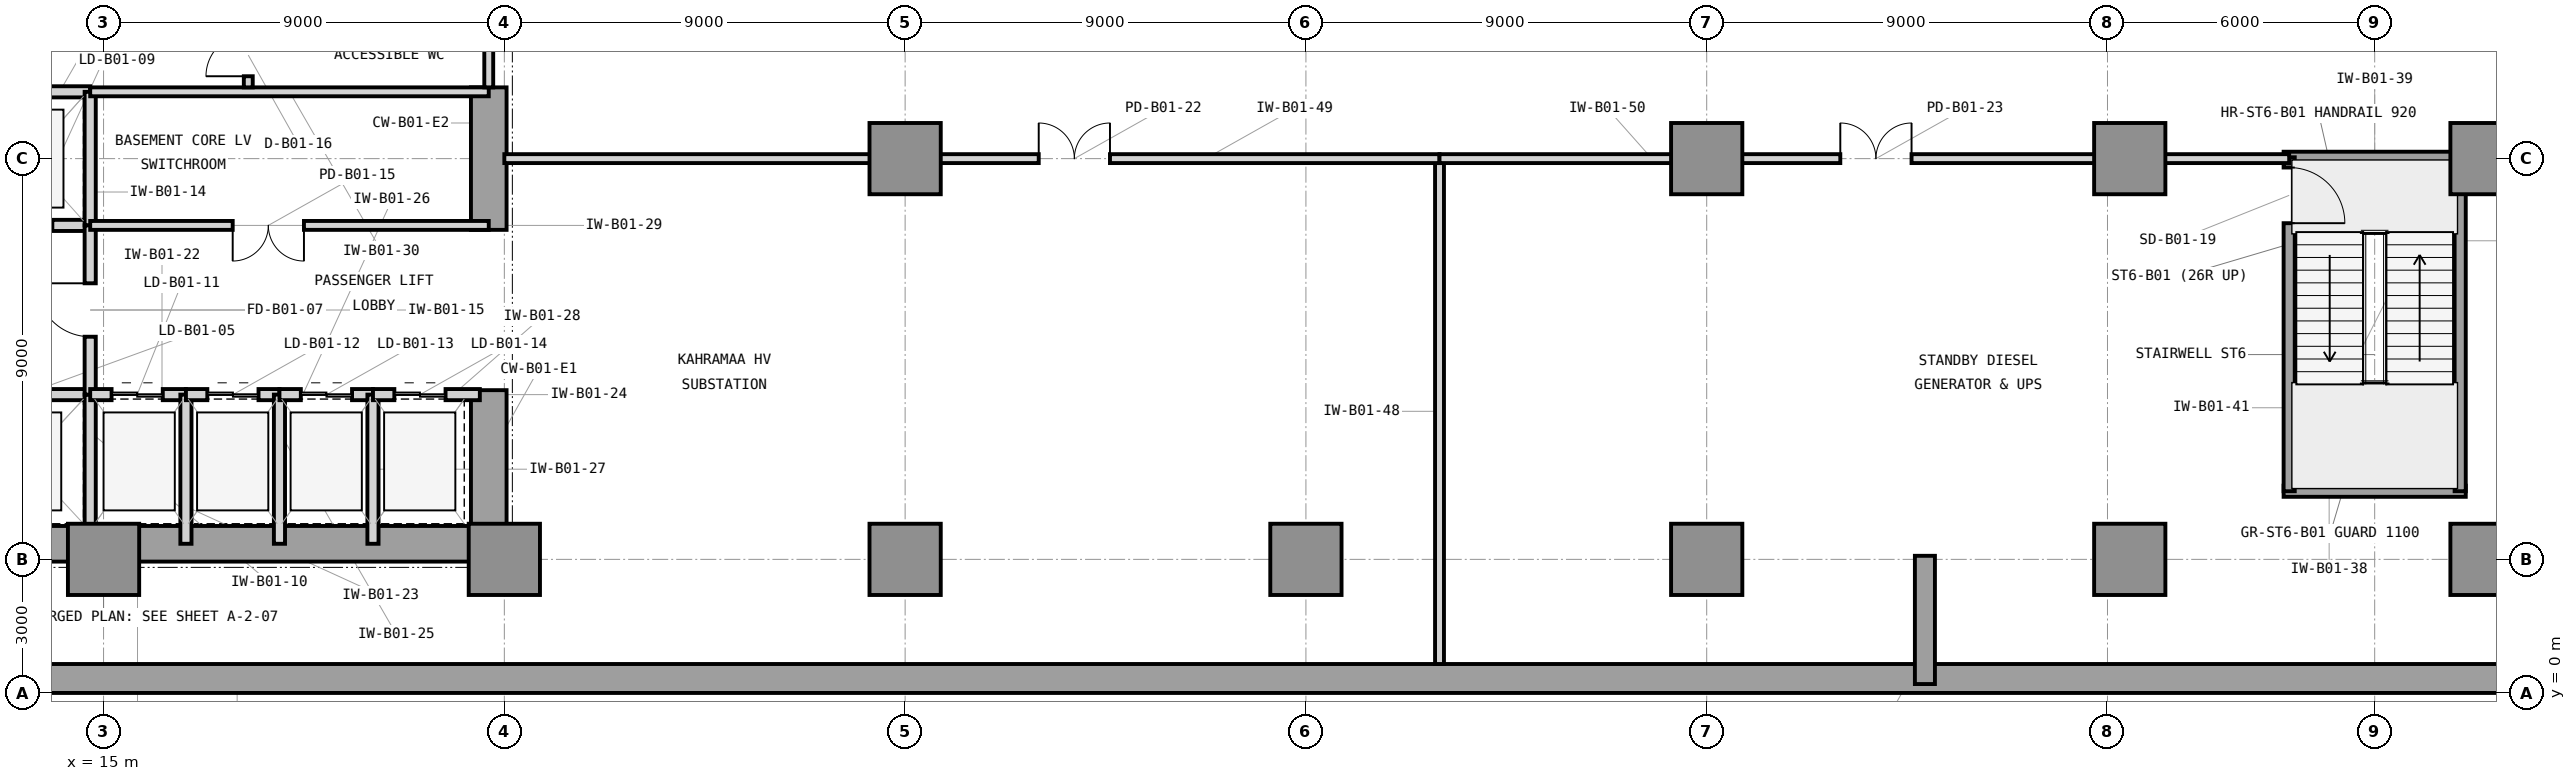
"""IFC4 building model, lengths in metres.
Left out: names, types, materials, properties, quantities, classifications, styles, units other than length and angle.
Written with IfcOpenShell. Run it as: python <this file> out.ifc"""

import sys

from ifc_helpers import new_model, si_unit, direction, frame, frame_2d, origin, origin_2d, place, context, subcontext, project, spatial, rectangle, extrude, element, fill, save


model = new_model("IFC4")
c1 = context("Model", 3, precision=1e-05, world=origin(), true_north=direction((0.0, 1.0)))
c2 = subcontext(c1, "Body", "Model", "MODEL_VIEW")
j1 = project(units=[si_unit("LENGTHUNIT", "METRE"), si_unit("PLANEANGLEUNIT", "RADIAN")], contexts=[c1])
p1 = place(None, origin())
s1 = spatial("IfcSite", under=j1, at=p1, CompositionType="ELEMENT")
p2 = place(p1, origin())
s2 = spatial("IfcBuilding", under=s1, at=p2, CompositionType="ELEMENT")
p3 = place(p2, frame((0.0, 0.0, -4.5)))
s3 = spatial("IfcBuildingStorey", under=s2, at=p3, CompositionType="ELEMENT", Elevation=-4.5)
p4 = place(p3, frame((0.0, 0.325, 0.0), z_axis=(0.0, 0.0, 1.0), x_axis=(1.0, 0.0, 0.0)))
e1 = element("IfcWall", 1, at=p4, inside=s3, PredefinedType="USERDEFINED", context=c2, shape_type="SweptSolid", body=[
    extrude(rectangle(XDim=72.0, YDim=0.65, at=frame_2d((36.0, 0.0))), origin(), (0.0, 0.0, 1.0), 4.5),
])
p5 = place(p3, frame((7.475, 3.35, 0.0), z_axis=(0.0, 0.0, 1.0), x_axis=(1.0, 0.0, 0.0)))
e2 = element("IfcWall", 2, at=p5, inside=s3, PredefinedType="SHEAR", context=c2, shape_type="SweptSolid", body=[
    extrude(rectangle(XDim=16.575, YDim=0.8, at=frame_2d((8.288, 0.0))), origin(), (0.0, 0.0, 1.0), 4.5),
])
p6 = place(p3, frame((23.65, 3.75, 0.0), z_axis=(0.0, 0.0, 1.0), x_axis=(0.0, 1.0, 0.0)))
e3 = element("IfcWall", 3, at=p6, inside=s3, PredefinedType="SHEAR", context=c2, shape_type="SweptSolid", body=[
    extrude(rectangle(XDim=3.05, YDim=0.8, at=frame_2d((1.525, 0.0))), origin(), (0.0, 0.0, 1.0), 4.5),
])
p7 = place(p3, frame((23.65, 10.4, 0.0), z_axis=(0.0, 0.0, 1.0), x_axis=(0.0, 1.0, 0.0)))
e4 = element("IfcWall", 4, at=p7, inside=s3, PredefinedType="SHEAR", context=c2, shape_type="SweptSolid", body=[
    extrude(rectangle(XDim=3.2, YDim=0.8, at=frame_2d((1.6, 0.0))), origin(), (0.0, 0.0, 1.0), 4.5),
])
for number, where, z_axis, x_axis in (
    (5, (15.0, 3.0, 0.0), (0.0, 0.0, 1.0), (1.0, 0.0, 0.0)),
    (6, (24.0, 3.0, 0.0), (0.0, 0.0, 1.0), (1.0, 0.0, 0.0)),
    (7, (33.0, 3.0, 0.0), (0.0, 0.0, 1.0), (1.0, 0.0, 0.0)),
    (8, (33.0, 12.0, 0.0), (0.0, 0.0, 1.0), (1.0, 0.0, 0.0)),
    (9, (42.0, 3.0, 0.0), (0.0, 0.0, 1.0), (1.0, 0.0, 0.0)),
    (10, (51.0, 3.0, 0.0), (0.0, 0.0, 1.0), (1.0, 0.0, 0.0)),
    (11, (51.0, 12.0, 0.0), (0.0, 0.0, 1.0), (1.0, 0.0, 0.0)),
    (12, (60.5, 3.0, 0.0), (0.0, 0.0, 1.0), (1.0, 0.0, 0.0)),
    (13, (60.5, 12.0, 0.0), (0.0, 0.0, 1.0), (1.0, 0.0, 0.0)),
    (14, (68.5, 3.0, 0.0), (0.0, 0.0, 1.0), (1.0, 0.0, 0.0)),
    (15, (68.5, 12.0, 0.0), (0.0, 0.0, 1.0), (1.0, 0.0, 0.0)),
):
    element("IfcColumn", number, at=place(p3, frame(where, z_axis=z_axis, x_axis=x_axis)), inside=s3, PredefinedType="COLUMN", context=c2, shape_type="SweptSolid", body=[
        extrude(rectangle(XDim=1.6, YDim=1.6, at=origin_2d()), origin(), (0.0, 0.0, 1.0), 4.5),
    ])
p8 = place(p3, frame((11.82, 6.7, 0.0), z_axis=(0.0, 0.0, 1.0), x_axis=(1.0, 0.0, 0.0)))
e16 = element("IfcWall", 16, at=p8, inside=s3, PredefinedType="PARTITIONING", context=c2, shape_type="SweptSolid", body=[
    extrude(rectangle(XDim=2.88, YDim=0.25, at=frame_2d((1.44, 0.0))), origin(), (0.0, 0.0, 1.0), 3.573),
])
p9 = place(p8, frame((0.85, 0.0, 0.0)))
e17 = element("IfcOpeningElement", 17, at=p9, cuts=e16, PredefinedType="OPENING", context=c2, shape_type="SweptSolid", body=[
    extrude(rectangle(XDim=1.1, YDim=2.25, at=frame_2d((0.55, 1.125))), frame((0.0, 0.135, 0.0), z_axis=(0.0, -1.0, 0.0), x_axis=(1.0, 0.0, 0.0)), (0.0, 0.0, 1.0), 0.27),
])
p10 = place(p3, frame((14.7, 3.35, 0.0), z_axis=(0.0, 0.0, 1.0), x_axis=(0.0, 1.0, 0.0)))
e18 = element("IfcWall", 18, at=p10, inside=s3, PredefinedType="PARTITIONING", context=c2, shape_type="SweptSolid", body=[
    extrude(rectangle(XDim=3.35, YDim=0.25, at=frame_2d((1.675, 0.0))), origin(), (0.0, 0.0, 1.0), 4.19),
])
p11 = place(p3, frame((11.95, 10.5, 0.0), z_axis=(0.0, 0.0, 1.0), x_axis=(1.0, 0.0, 0.0)))
e19 = element("IfcWall", 19, at=p11, inside=s3, PredefinedType="PARTITIONING", context=c2, shape_type="SweptSolid", body=[
    extrude(rectangle(XDim=2.75, YDim=0.25, at=frame_2d((1.375, 0.0))), origin(), (0.0, 0.0, 1.0), 3.573),
])
p12 = place(p11, frame((0.8, 0.0, 0.0)))
e20 = element("IfcOpeningElement", 20, at=p12, cuts=e19, PredefinedType="OPENING", context=c2, shape_type="SweptSolid", body=[
    extrude(rectangle(XDim=1.1, YDim=2.25, at=frame_2d((0.55, 1.125))), frame((0.0, 0.135, 0.0), z_axis=(0.0, -1.0, 0.0), x_axis=(1.0, 0.0, 0.0)), (0.0, 0.0, 1.0), 0.27),
])
p13 = place(p3, frame((11.95, 13.5, 0.0), z_axis=(0.0, 0.0, 1.0), x_axis=(1.0, 0.0, 0.0)))
e21 = element("IfcWall", 21, at=p13, inside=s3, PredefinedType="PARTITIONING", context=c2, shape_type="SweptSolid", body=[
    extrude(rectangle(XDim=2.75, YDim=0.25, at=frame_2d((1.375, 0.0))), origin(), (0.0, 0.0, 1.0), 3.573),
])
p14 = place(p3, frame((14.7, 10.5, 0.0), z_axis=(0.0, 0.0, 1.0), x_axis=(0.0, 1.0, 0.0)))
e22 = element("IfcWall", 22, at=p14, inside=s3, PredefinedType="PARTITIONING", context=c2, shape_type="SweptSolid", body=[
    extrude(rectangle(XDim=3.0, YDim=0.25, at=frame_2d((1.5, 0.0))), origin(), (0.0, 0.0, 1.0), 4.19),
])
p15 = place(p3, frame((14.7, 6.7, 0.0), z_axis=(0.0, 0.0, 1.0), x_axis=(0.0, 1.0, 0.0)))
e23 = element("IfcWall", 23, at=p15, inside=s3, PredefinedType="PARTITIONING", context=c2, shape_type="SweptSolid", body=[
    extrude(rectangle(XDim=3.8, YDim=0.25, at=frame_2d((1.9, 0.0))), origin(), (0.0, 0.0, 1.0), 4.19),
])
p16 = place(p15, frame((1.3, 0.0, 0.0)))
e24 = element("IfcOpeningElement", 24, at=p16, cuts=e23, PredefinedType="OPENING", context=c2, shape_type="SweptSolid", body=[
    extrude(rectangle(XDim=1.2, YDim=2.2, at=frame_2d((0.6, 1.1))), frame((0.0, 0.135, 0.0), z_axis=(0.0, -1.0, 0.0), x_axis=(1.0, 0.0, 0.0)), (0.0, 0.0, 1.0), 0.27),
])
p17 = place(p3, frame((14.7, 6.7, 0.0), z_axis=(0.0, 0.0, 1.0), x_axis=(1.0, 0.0, 0.0)))
e25 = element("IfcWall", 25, at=p17, inside=s3, PredefinedType="PARTITIONING", context=c2, shape_type="SweptSolid", body=[
    extrude(rectangle(XDim=2.15, YDim=0.25, at=frame_2d((1.075, 0.0))), origin(), (0.0, 0.0, 1.0), 3.573),
])
p18 = place(p17, frame((0.48, 0.0, 0.0)))
e26 = element("IfcOpeningElement", 26, at=p18, cuts=e25, PredefinedType="OPENING", context=c2, shape_type="SweptSolid", body=[
    extrude(rectangle(XDim=1.15, YDim=2.25, at=frame_2d((0.575, 1.125))), frame((0.0, 0.135, 0.0), z_axis=(0.0, -1.0, 0.0), x_axis=(1.0, 0.0, 0.0)), (0.0, 0.0, 1.0), 0.27),
])
p19 = place(p3, frame((16.85, 3.35, 0.0), z_axis=(0.0, 0.0, 1.0), x_axis=(0.0, 1.0, 0.0)))
e27 = element("IfcWall", 27, at=p19, inside=s3, PredefinedType="PARTITIONING", context=c2, shape_type="SweptSolid", body=[
    extrude(rectangle(XDim=3.35, YDim=0.25, at=frame_2d((1.675, 0.0))), origin(), (0.0, 0.0, 1.0), 4.19),
])
p20 = place(p3, frame((16.85, 6.7, 0.0), z_axis=(0.0, 0.0, 1.0), x_axis=(1.0, 0.0, 0.0)))
e28 = element("IfcWall", 28, at=p20, inside=s3, PredefinedType="PARTITIONING", context=c2, shape_type="SweptSolid", body=[
    extrude(rectangle(XDim=2.1, YDim=0.25, at=frame_2d((1.05, 0.0))), origin(), (0.0, 0.0, 1.0), 3.573),
])
p21 = place(p20, frame((0.48, 0.0, 0.0)))
e29 = element("IfcOpeningElement", 29, at=p21, cuts=e28, PredefinedType="OPENING", context=c2, shape_type="SweptSolid", body=[
    extrude(rectangle(XDim=1.15, YDim=2.25, at=frame_2d((0.575, 1.125))), frame((0.0, 0.135, 0.0), z_axis=(0.0, -1.0, 0.0), x_axis=(1.0, 0.0, 0.0)), (0.0, 0.0, 1.0), 0.27),
])
p22 = place(p3, frame((18.95, 3.35, 0.0), z_axis=(0.0, 0.0, 1.0), x_axis=(0.0, 1.0, 0.0)))
e30 = element("IfcWall", 30, at=p22, inside=s3, PredefinedType="PARTITIONING", context=c2, shape_type="SweptSolid", body=[
    extrude(rectangle(XDim=3.35, YDim=0.25, at=frame_2d((1.675, 0.0))), origin(), (0.0, 0.0, 1.0), 4.19),
])
p23 = place(p3, frame((18.95, 6.7, 0.0), z_axis=(0.0, 0.0, 1.0), x_axis=(1.0, 0.0, 0.0)))
e31 = element("IfcWall", 31, at=p23, inside=s3, PredefinedType="PARTITIONING", context=c2, shape_type="SweptSolid", body=[
    extrude(rectangle(XDim=2.1, YDim=0.25, at=frame_2d((1.05, 0.0))), origin(), (0.0, 0.0, 1.0), 3.573),
])
p24 = place(p23, frame((0.48, 0.0, 0.0)))
e32 = element("IfcOpeningElement", 32, at=p24, cuts=e31, PredefinedType="OPENING", context=c2, shape_type="SweptSolid", body=[
    extrude(rectangle(XDim=1.15, YDim=2.25, at=frame_2d((0.575, 1.125))), frame((0.0, 0.135, 0.0), z_axis=(0.0, -1.0, 0.0), x_axis=(1.0, 0.0, 0.0)), (0.0, 0.0, 1.0), 0.27),
])
p25 = place(p3, frame((21.05, 3.35, 0.0), z_axis=(0.0, 0.0, 1.0), x_axis=(0.0, 1.0, 0.0)))
e33 = element("IfcWall", 33, at=p25, inside=s3, PredefinedType="PARTITIONING", context=c2, shape_type="SweptSolid", body=[
    extrude(rectangle(XDim=3.35, YDim=0.25, at=frame_2d((1.675, 0.0))), origin(), (0.0, 0.0, 1.0), 4.19),
])
p26 = place(p3, frame((21.05, 6.7, 0.0), z_axis=(0.0, 0.0, 1.0), x_axis=(1.0, 0.0, 0.0)))
e34 = element("IfcWall", 34, at=p26, inside=s3, PredefinedType="PARTITIONING", context=c2, shape_type="SweptSolid", body=[
    extrude(rectangle(XDim=2.4, YDim=0.25, at=frame_2d((1.2, 0.0))), origin(), (0.0, 0.0, 1.0), 3.573),
])
p27 = place(p26, frame((0.48, 0.0, 0.0)))
e35 = element("IfcOpeningElement", 35, at=p27, cuts=e34, PredefinedType="OPENING", context=c2, shape_type="SweptSolid", body=[
    extrude(rectangle(XDim=1.15, YDim=2.25, at=frame_2d((0.575, 1.125))), frame((0.0, 0.135, 0.0), z_axis=(0.0, -1.0, 0.0), x_axis=(1.0, 0.0, 0.0)), (0.0, 0.0, 1.0), 0.27),
])
p28 = place(p3, frame((14.7, 10.5, 0.0), z_axis=(0.0, 0.0, 1.0), x_axis=(1.0, 0.0, 0.0)))
e36 = element("IfcWall", 36, at=p28, inside=s3, PredefinedType="PARTITIONING", context=c2, shape_type="SweptSolid", body=[
    extrude(rectangle(XDim=8.95, YDim=0.2, at=frame_2d((4.475, 0.0))), origin(), (0.0, 0.0, 1.0), 3.573),
])
p29 = place(p28, frame((3.2, 0.0, 0.0)))
e37 = element("IfcOpeningElement", 37, at=p29, cuts=e36, PredefinedType="OPENING", context=c2, shape_type="SweptSolid", body=[
    extrude(rectangle(XDim=1.6, YDim=2.3, at=frame_2d((0.8, 1.15))), frame((0.0, 0.11, 0.0), z_axis=(0.0, -1.0, 0.0), x_axis=(1.0, 0.0, 0.0)), (0.0, 0.0, 1.0), 0.22),
])
p30 = place(p3, frame((14.7, 13.5, 0.0), z_axis=(0.0, 0.0, 1.0), x_axis=(1.0, 0.0, 0.0)))
e38 = element("IfcWall", 38, at=p30, inside=s3, PredefinedType="PARTITIONING", context=c2, shape_type="SweptSolid", body=[
    extrude(rectangle(XDim=8.95, YDim=0.2, at=frame_2d((4.475, 0.0))), origin(), (0.0, 0.0, 1.0), 3.573),
])
p31 = place(p3, frame((18.25, 13.6, 0.0), z_axis=(0.0, 0.0, 1.0), x_axis=(0.0, 1.0, 0.0)))
e39 = element("IfcWall", 39, at=p31, inside=s3, PredefinedType="PARTITIONING", context=c2, shape_type="SweptSolid", body=[
    extrude(rectangle(XDim=3.0, YDim=0.2, at=frame_2d((1.5, 0.0))), origin(), (0.0, 0.0, 1.0), 4.19),
])
p32 = place(p31, frame((0.25, 0.0, 0.0)))
e40 = element("IfcOpeningElement", 40, at=p32, cuts=e39, PredefinedType="OPENING", context=c2, shape_type="SweptSolid", body=[
    extrude(rectangle(XDim=0.95, YDim=2.1, at=frame_2d((0.475, 1.05))), frame((0.0, 0.11, 0.0), z_axis=(0.0, -1.0, 0.0), x_axis=(1.0, 0.0, 0.0)), (0.0, 0.0, 1.0), 0.22),
])
p33 = place(p31, frame((1.8, 0.0, 0.0)))
e41 = element("IfcOpeningElement", 41, at=p33, cuts=e39, PredefinedType="OPENING", context=c2, shape_type="SweptSolid", body=[
    extrude(rectangle(XDim=0.95, YDim=2.1, at=frame_2d((0.475, 1.05))), frame((0.0, 0.11, 0.0), z_axis=(0.0, -1.0, 0.0), x_axis=(1.0, 0.0, 0.0)), (0.0, 0.0, 1.0), 0.22),
])
p34 = place(p3, frame((23.65, 13.6, 0.0), z_axis=(0.0, 0.0, 1.0), x_axis=(0.0, 1.0, 0.0)))
e42 = element("IfcWall", 42, at=p34, inside=s3, PredefinedType="PARTITIONING", context=c2, shape_type="SweptSolid", body=[
    extrude(rectangle(XDim=3.0, YDim=0.2, at=frame_2d((1.5, 0.0))), origin(), (0.0, 0.0, 1.0), 4.19),
])
for number, where, z_axis, x_axis in (
    (43, (63.955, 4.53, 0.0), (0.0, 0.0, 1.0), (1.0, 0.0, 0.0)),
    (44, (63.955, 12.03, 0.0), (0.0, 0.0, 1.0), (1.0, 0.0, 0.0)),
):
    element("IfcWall", number, at=place(p3, frame(where, z_axis=z_axis, x_axis=x_axis)), inside=s3, PredefinedType="SHEAR", context=c2, shape_type="SweptSolid", body=[
        extrude(rectangle(XDim=4.09, YDim=0.25, at=frame_2d((2.045, 0.0))), origin(), (0.0, 0.0, 1.0), 4.5),
    ])
p35 = place(p3, frame((67.92, 4.53, 0.0), z_axis=(0.0, 0.0, 1.0), x_axis=(0.0, 1.0, 0.0)))
e45 = element("IfcWall", 45, at=p35, inside=s3, PredefinedType="SHEAR", context=c2, shape_type="SweptSolid", body=[
    extrude(rectangle(XDim=7.5, YDim=0.25, at=frame_2d((3.75, 0.0))), origin(), (0.0, 0.0, 1.0), 4.5),
])
p36 = place(p3, frame((64.08, 4.53, 0.0), z_axis=(0.0, 0.0, 1.0), x_axis=(0.0, 1.0, 0.0)))
e46 = element("IfcWall", 46, at=p36, inside=s3, PredefinedType="SHEAR", context=c2, shape_type="SweptSolid", body=[
    extrude(rectangle(XDim=7.5, YDim=0.25, at=frame_2d((3.75, 0.0))), origin(), (0.0, 0.0, 1.0), 4.5),
])
p37 = place(p36, frame((6.02, 0.0, 0.0)))
e47 = element("IfcOpeningElement", 47, at=p37, cuts=e46, PredefinedType="OPENING", context=c2, shape_type="SweptSolid", body=[
    extrude(rectangle(XDim=1.25, YDim=2.2, at=frame_2d((0.625, 1.1))), frame((0.0, 0.135, 0.0), z_axis=(0.0, -1.0, 0.0), x_axis=(1.0, 0.0, 0.0)), (0.0, 0.0, 1.0), 0.27),
])
p38 = place(p3, frame((45.0, 0.65, 0.0), z_axis=(0.0, 0.0, 1.0), x_axis=(0.0, 1.0, 0.0)))
e48 = element("IfcWall", 48, at=p38, inside=s3, PredefinedType="PARTITIONING", context=c2, shape_type="SweptSolid", body=[
    extrude(rectangle(XDim=11.35, YDim=0.2, at=frame_2d((5.675, 0.0))), origin(), (0.0, 0.0, 1.0), 4.19),
])
p39 = place(p3, frame((24.0, 12.0, 0.0), z_axis=(0.0, 0.0, 1.0), x_axis=(1.0, 0.0, 0.0)))
e49 = element("IfcWall", 49, at=p39, inside=s3, PredefinedType="PARTITIONING", context=c2, shape_type="SweptSolid", body=[
    extrude(rectangle(XDim=21.0, YDim=0.2, at=frame_2d((10.5, 0.0))), origin(), (0.0, 0.0, 1.0), 3.334),
])
p40 = place(p39, frame((12.0, 0.0, 0.0)))
e50 = element("IfcOpeningElement", 50, at=p40, cuts=e49, PredefinedType="OPENING", context=c2, shape_type="SweptSolid", body=[
    extrude(rectangle(XDim=1.6, YDim=2.3, at=frame_2d((0.8, 1.15))), frame((0.0, 0.11, 0.0), z_axis=(0.0, -1.0, 0.0), x_axis=(1.0, 0.0, 0.0)), (0.0, 0.0, 1.0), 0.22),
])
p41 = place(p3, frame((45.0, 12.0, 0.0), z_axis=(0.0, 0.0, 1.0), x_axis=(1.0, 0.0, 0.0)))
e51 = element("IfcWall", 51, at=p41, inside=s3, PredefinedType="PARTITIONING", context=c2, shape_type="SweptSolid", body=[
    extrude(rectangle(XDim=19.08, YDim=0.2, at=frame_2d((9.54, 0.0))), origin(), (0.0, 0.0, 1.0), 3.334),
])
p42 = place(p41, frame((9.0, 0.0, 0.0)))
e52 = element("IfcOpeningElement", 52, at=p42, cuts=e51, PredefinedType="OPENING", context=c2, shape_type="SweptSolid", body=[
    extrude(rectangle(XDim=1.6, YDim=2.3, at=frame_2d((0.8, 1.15))), frame((0.0, 0.11, 0.0), z_axis=(0.0, -1.0, 0.0), x_axis=(1.0, 0.0, 0.0)), (0.0, 0.0, 1.0), 0.22),
])
p43 = place(p3, frame((55.9, 0.2, 0.0), z_axis=(0.0, 0.0, 1.0), x_axis=(0.0, 1.0, 0.0)))
e53 = element("IfcWall", 53, at=p43, inside=s3, PredefinedType="SHEAR", context=c2, shape_type="SweptSolid", body=[
    extrude(rectangle(XDim=2.88, YDim=0.45, at=frame_2d((1.44, 0.0))), origin(), (0.0, 0.0, 1.0), 4.22),
])
p44 = place(p16, origin())
e54 = element("IfcDoor", 54, at=p44, inside=s3, OperationType="SINGLE_SWING_RIGHT", PredefinedType="DOOR", context=c2, shape_type="SweptSolid", body=[
    extrude(rectangle(XDim=1.2, YDim=2.2, at=frame_2d((0.6, 1.1))), frame((0.0, 0.025, 0.0), z_axis=(0.0, -1.0, 0.0), x_axis=(1.0, 0.0, 0.0)), (0.0, 0.0, 1.0), 0.05),
])
fill(e24, e54)
p45 = place(p18, origin())
e55 = element("IfcDoor", 55, at=p45, inside=s3, OperationType="DOUBLE_DOOR_SLIDING", PredefinedType="DOOR", context=c2, shape_type="SweptSolid", body=[
    extrude(rectangle(XDim=1.15, YDim=2.25, at=frame_2d((0.575, 1.125))), frame((0.0, 0.025, 0.0), z_axis=(0.0, -1.0, 0.0), x_axis=(1.0, 0.0, 0.0)), (0.0, 0.0, 1.0), 0.05),
])
fill(e26, e55)
p46 = place(p21, origin())
e56 = element("IfcDoor", 56, at=p46, inside=s3, OperationType="DOUBLE_DOOR_SLIDING", PredefinedType="DOOR", context=c2, shape_type="SweptSolid", body=[
    extrude(rectangle(XDim=1.15, YDim=2.25, at=frame_2d((0.575, 1.125))), frame((0.0, 0.025, 0.0), z_axis=(0.0, -1.0, 0.0), x_axis=(1.0, 0.0, 0.0)), (0.0, 0.0, 1.0), 0.05),
])
fill(e29, e56)
p47 = place(p24, origin())
e57 = element("IfcDoor", 57, at=p47, inside=s3, OperationType="DOUBLE_DOOR_SLIDING", PredefinedType="DOOR", context=c2, shape_type="SweptSolid", body=[
    extrude(rectangle(XDim=1.15, YDim=2.25, at=frame_2d((0.575, 1.125))), frame((0.0, 0.025, 0.0), z_axis=(0.0, -1.0, 0.0), x_axis=(1.0, 0.0, 0.0)), (0.0, 0.0, 1.0), 0.05),
])
fill(e32, e57)
p48 = place(p27, origin())
e58 = element("IfcDoor", 58, at=p48, inside=s3, OperationType="DOUBLE_DOOR_SLIDING", PredefinedType="DOOR", context=c2, shape_type="SweptSolid", body=[
    extrude(rectangle(XDim=1.15, YDim=2.25, at=frame_2d((0.575, 1.125))), frame((0.0, 0.025, 0.0), z_axis=(0.0, -1.0, 0.0), x_axis=(1.0, 0.0, 0.0)), (0.0, 0.0, 1.0), 0.05),
])
fill(e35, e58)
p49 = place(p29, frame((1.6, 0.0, 0.0), z_axis=(0.0, 0.0, 1.0), x_axis=(-1.0, 0.0, 0.0)))
e59 = element("IfcDoor", 59, at=p49, inside=s3, OperationType="DOUBLE_DOOR_SINGLE_SWING", PredefinedType="DOOR", context=c2, shape_type="SweptSolid", body=[
    extrude(rectangle(XDim=1.6, YDim=2.3, at=frame_2d((0.8, 1.15))), frame((0.0, 0.025, 0.0), z_axis=(0.0, -1.0, 0.0), x_axis=(1.0, 0.0, 0.0)), (0.0, 0.0, 1.0), 0.05),
])
fill(e37, e59)
p50 = place(p32, origin())
e60 = element("IfcDoor", 60, at=p50, inside=s3, OperationType="SINGLE_SWING_LEFT", PredefinedType="DOOR", context=c2, shape_type="SweptSolid", body=[
    extrude(rectangle(XDim=0.95, YDim=2.1, at=frame_2d((0.475, 1.05))), frame((0.0, 0.025, 0.0), z_axis=(0.0, -1.0, 0.0), x_axis=(1.0, 0.0, 0.0)), (0.0, 0.0, 1.0), 0.05),
])
fill(e40, e60)
p51 = place(p37, frame((1.25, 0.0, 0.0), z_axis=(0.0, 0.0, 1.0), x_axis=(-1.0, 0.0, 0.0)))
e61 = element("IfcDoor", 61, at=p51, inside=s3, OperationType="SINGLE_SWING_RIGHT", PredefinedType="DOOR", context=c2, shape_type="SweptSolid", body=[
    extrude(rectangle(XDim=1.25, YDim=2.2, at=frame_2d((0.625, 1.1))), frame((0.0, 0.025, 0.0), z_axis=(0.0, -1.0, 0.0), x_axis=(1.0, 0.0, 0.0)), (0.0, 0.0, 1.0), 0.05),
])
fill(e47, e61)
p52 = place(p40, origin())
e62 = element("IfcDoor", 62, at=p52, inside=s3, OperationType="DOUBLE_DOOR_SINGLE_SWING", PredefinedType="DOOR", context=c2, shape_type="SweptSolid", body=[
    extrude(rectangle(XDim=1.6, YDim=2.3, at=frame_2d((0.8, 1.15))), frame((0.0, 0.025, 0.0), z_axis=(0.0, -1.0, 0.0), x_axis=(1.0, 0.0, 0.0)), (0.0, 0.0, 1.0), 0.05),
])
fill(e50, e62)
p53 = place(p42, origin())
e63 = element("IfcDoor", 63, at=p53, inside=s3, OperationType="DOUBLE_DOOR_SINGLE_SWING", PredefinedType="DOOR", context=c2, shape_type="SweptSolid", body=[
    extrude(rectangle(XDim=1.6, YDim=2.3, at=frame_2d((0.8, 1.15))), frame((0.0, 0.025, 0.0), z_axis=(0.0, -1.0, 0.0), x_axis=(1.0, 0.0, 0.0)), (0.0, 0.0, 1.0), 0.05),
])
fill(e52, e63)
save(model, sys.argv[1])
